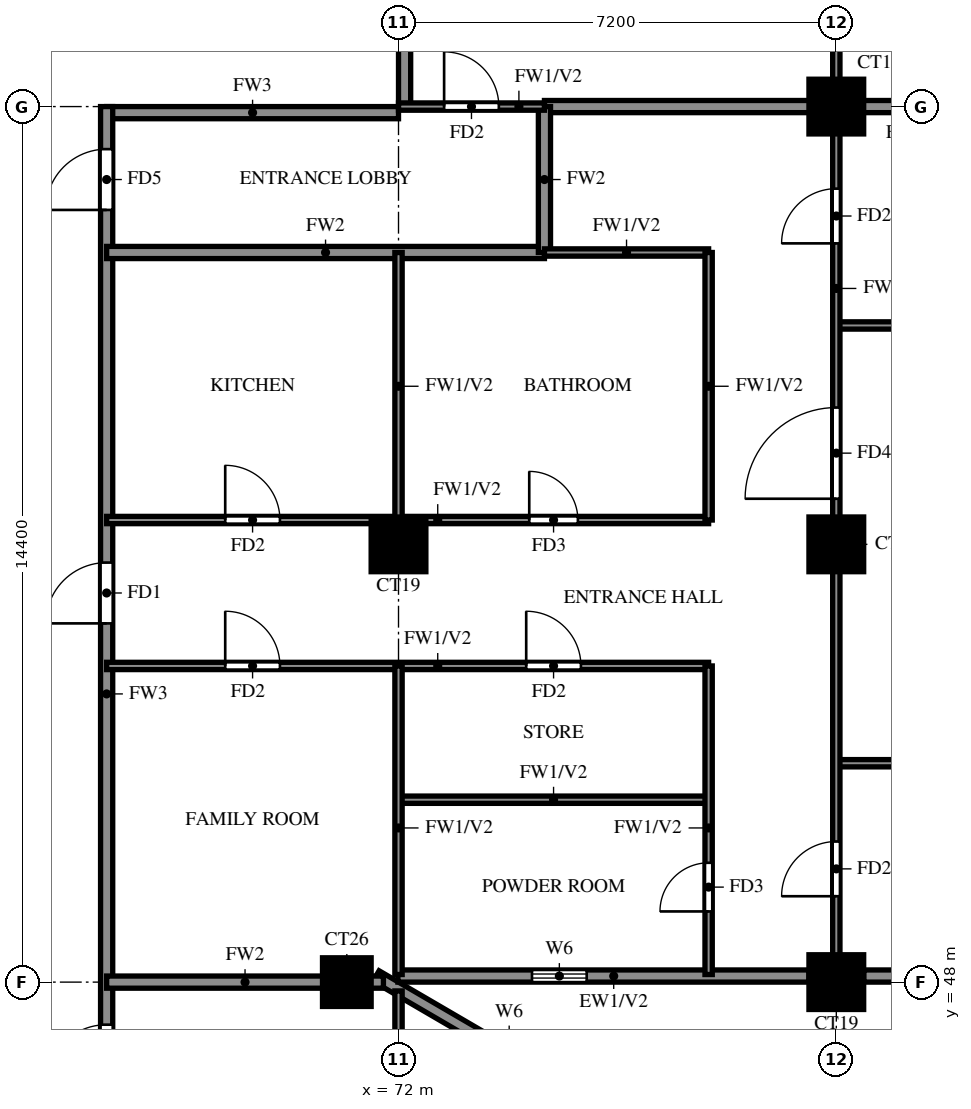
"""IFC4 building model, lengths in metres.
Left out: names, types, materials, properties, quantities, classifications, styles, units other than length and angle.
Written with IfcOpenShell. Run it as: python <this file> out.ifc"""

import sys

from ifc_helpers import new_model, si_unit, direction, frame, frame_2d, origin, origin_2d, place, context, subcontext, project, spatial, rectangle, extrude, source, transform, mapped, element, fill, save


model = new_model("IFC4")
c1 = context("Model", 3, precision=1e-05, world=origin(), true_north=direction((0.0, 1.0)))
c2 = subcontext(c1, "Body", "Model", "MODEL_VIEW")
j1 = project(units=[si_unit("LENGTHUNIT", "METRE"), si_unit("PLANEANGLEUNIT", "RADIAN")], contexts=[c1])
p1 = place(None, origin())
s1 = spatial("IfcSite", under=j1, at=p1, CompositionType="ELEMENT")
p2 = place(p1, origin())
s2 = spatial("IfcBuilding", under=s1, at=p2, CompositionType="ELEMENT")
p3 = place(p2, frame((0.0, 0.0, 188.5)))
s3 = spatial("IfcBuildingStorey", under=s2, at=p3, CompositionType="ELEMENT", Elevation=188.5)
m1 = source(origin(), c2, "Body", "SweptSolid", [
    extrude(rectangle(XDim=0.8, YDim=0.8, at=origin_2d()), origin(), (0.0, 0.0, 1.0), 3.2),
])
p4 = place(p3, frame((71.15, 48.0, 0.0), z_axis=(0.0, 0.0, 1.0), x_axis=(1.0, 0.0, 0.0)))
e1 = element("IfcColumn", 1, at=p4, inside=s3, PredefinedType="COLUMN", context=c2, shape_type="MappedRepresentation", body=[
    mapped(m1, transform((0.0, 0.0, 0.0))),
])
m2 = source(origin(), c2, "Body", "SweptSolid", [
    extrude(rectangle(XDim=0.9, YDim=0.9, at=origin_2d()), origin(), (0.0, 0.0, 1.0), 3.2),
])
for number, where, z_axis, x_axis in (
    (2, (79.2, 48.0, 0.0), (0.0, 0.0, 1.0), (1.0, 0.0, 0.0)),
    (3, (72.0, 55.2, 0.0), (0.0, 0.0, 1.0), (1.0, 0.0, 0.0)),
    (4, (79.2, 55.2, 0.0), (0.0, 0.0, 1.0), (1.0, 0.0, 0.0)),
    (5, (79.2, 62.4, 0.0), (0.0, 0.0, 1.0), (1.0, 0.0, 0.0)),
):
    element("IfcColumn", number, at=place(p3, frame(where, z_axis=z_axis, x_axis=x_axis)), inside=s3, PredefinedType="COLUMN", context=c2, shape_type="MappedRepresentation", body=[
        mapped(m2, transform((0.0, 0.0, 0.0))),
    ])
p5 = place(p3, frame((85.719, 39.881, 0.0), z_axis=(0.0, 0.0, 1.0), x_axis=(-0.86377618652, 0.503875678716, 0.0)))
e6 = element("IfcWall", 6, at=p5, inside=s3, PredefinedType="SOLIDWALL", context=c2, shape_type="SweptSolid", body=[
    extrude(rectangle(XDim=16.311, YDim=0.2, at=frame_2d((8.156, 0.0))), origin(), (0.0, 0.0, 1.0), 3.2),
])
p6 = place(p5, frame((13.326, 0.0, 1.5)))
e7 = element("IfcOpeningElement", 7, at=p6, cuts=e6, PredefinedType="OPENING", context=c2, shape_type="SweptSolid", body=[
    extrude(rectangle(XDim=0.9, YDim=0.9, at=frame_2d((0.45, 0.45))), frame((0.0, 0.11, 0.0), z_axis=(0.0, -1.0, 0.0), x_axis=(1.0, 0.0, 0.0)), (0.0, 0.0, 1.0), 0.22),
])
p7 = place(p3, frame((71.99, 48.1, 0.0), z_axis=(0.0, 0.0, 1.0), x_axis=(1.0, 0.0, 0.0)))
e8 = element("IfcWall", 8, at=p7, inside=s3, PredefinedType="SOLIDWALL", context=c2, shape_type="SweptSolid", body=[
    extrude(rectangle(XDim=6.76, YDim=0.2, at=frame_2d((3.38, 0.0))), origin(), (0.0, 0.0, 1.0), 3.2),
])
p8 = place(p7, frame((2.205, 0.0, 1.5)))
e9 = element("IfcOpeningElement", 9, at=p8, cuts=e8, PredefinedType="OPENING", context=c2, shape_type="SweptSolid", body=[
    extrude(rectangle(XDim=0.9, YDim=0.9, at=frame_2d((0.45, 0.45))), frame((0.0, 0.11, 0.0), z_axis=(0.0, -1.0, 0.0), x_axis=(1.0, 0.0, 0.0)), (0.0, 0.0, 1.0), 0.22),
])
p9 = place(p3, frame((79.65, 48.1, 0.0), z_axis=(0.0, 0.0, 1.0), x_axis=(1.0, 0.0, 0.0)))
e10 = element("IfcWall", 10, at=p9, inside=s3, PredefinedType="SOLIDWALL", context=c2, shape_type="SweptSolid", body=[
    extrude(rectangle(XDim=5.75, YDim=0.2, at=frame_2d((2.875, 0.0))), origin(), (0.0, 0.0, 1.0), 3.2),
])
p10 = place(p9, frame((1.675, 0.0, 0.6)))
e11 = element("IfcOpeningElement", 11, at=p10, cuts=e10, PredefinedType="OPENING", context=c2, shape_type="SweptSolid", body=[
    extrude(rectangle(XDim=2.4, YDim=2.4, at=frame_2d((1.2, 1.2))), frame((0.0, 0.11, 0.0), z_axis=(0.0, -1.0, 0.0), x_axis=(1.0, 0.0, 0.0)), (0.0, 0.0, 1.0), 0.22),
])
p11 = place(p3, frame((67.2, 62.3, 0.0), z_axis=(0.0, 0.0, 1.0), x_axis=(1.0, 0.0, 0.0)))
e12 = element("IfcWall", 12, at=p11, inside=s3, PredefinedType="SOLIDWALL", context=c2, shape_type="SweptSolid", body=[
    extrude(rectangle(XDim=4.8, YDim=0.2, at=frame_2d((2.4, 0.0))), origin(), (0.0, 0.0, 1.0), 3.2),
])
p12 = place(p3, frame((67.2, 45.6, 0.0), z_axis=(0.0, 0.0, 1.0), x_axis=(0.0, 1.0, 0.0)))
e13 = element("IfcWall", 13, at=p12, inside=s3, PredefinedType="SOLIDWALL", context=c2, shape_type="SweptSolid", body=[
    extrude(rectangle(XDim=16.8, YDim=0.2, at=frame_2d((8.4, 0.0))), origin(), (0.0, 0.0, 1.0), 3.2),
])
p13 = place(p12, frame((8.3, 0.0, 0.0)))
e14 = element("IfcOpeningElement", 14, at=p13, cuts=e13, PredefinedType="OPENING", context=c2, shape_type="SweptSolid", body=[
    extrude(rectangle(XDim=1.0, YDim=2.1, at=frame_2d((0.5, 1.05))), frame((0.0, 0.11, 0.0), z_axis=(0.0, -1.0, 0.0), x_axis=(1.0, 0.0, 0.0)), (0.0, 0.0, 1.0), 0.22),
])
p14 = place(p12, frame((15.1, 0.0, 0.0)))
e15 = element("IfcOpeningElement", 15, at=p14, cuts=e13, PredefinedType="OPENING", context=c2, shape_type="SweptSolid", body=[
    extrude(rectangle(XDim=1.0, YDim=2.1, at=frame_2d((0.5, 1.05))), frame((0.0, 0.11, 0.0), z_axis=(0.0, -1.0, 0.0), x_axis=(1.0, 0.0, 0.0)), (0.0, 0.0, 1.0), 0.22),
])
p15 = place(p12, frame((0.7, 0.0, 0.0)))
e16 = element("IfcOpeningElement", 16, at=p15, cuts=e13, PredefinedType="OPENING", context=c2, shape_type="SweptSolid", body=[
    extrude(rectangle(XDim=1.0, YDim=2.1, at=frame_2d((0.5, 1.05))), frame((0.0, 0.11, 0.0), z_axis=(0.0, -1.0, 0.0), x_axis=(1.0, 0.0, 0.0)), (0.0, 0.0, 1.0), 0.22),
])
p16 = place(p3, frame((72.1, 62.4, 0.0), z_axis=(0.0, 0.0, 1.0), x_axis=(0.0, 1.0, 0.0)))
e17 = element("IfcWall", 17, at=p16, inside=s3, PredefinedType="SOLIDWALL", context=c2, shape_type="SweptSolid", body=[
    extrude(rectangle(XDim=15.6, YDim=0.2, at=frame_2d((7.8, 0.0))), origin(), (0.0, 0.0, 1.0), 3.2),
])
p17 = place(p3, frame((67.2, 48.0, 0.0), z_axis=(0.0, 0.0, 1.0), x_axis=(1.0, 0.0, 0.0)))
e18 = element("IfcWall", 18, at=p17, inside=s3, PredefinedType="SOLIDWALL", context=c2, shape_type="SweptSolid", body=[
    extrude(rectangle(XDim=4.552, YDim=0.2, at=frame_2d((2.276, 0.0))), origin(), (0.0, 0.0, 1.0), 3.2),
])
p18 = place(p3, frame((67.2, 60.0, 0.0), z_axis=(0.0, 0.0, 1.0), x_axis=(1.0, 0.0, 0.0)))
e19 = element("IfcWall", 19, at=p18, inside=s3, PredefinedType="SOLIDWALL", context=c2, shape_type="SweptSolid", body=[
    extrude(rectangle(XDim=7.2, YDim=0.2, at=frame_2d((3.6, 0.0))), origin(), (0.0, 0.0, 1.0), 3.2),
])
p19 = place(p3, frame((74.4, 62.4, 0.0), z_axis=(0.0, 0.0, 1.0), x_axis=(1.0, 0.0, 0.0)))
e20 = element("IfcWall", 20, at=p19, inside=s3, PredefinedType="SOLIDWALL", context=c2, shape_type="SweptSolid", body=[
    extrude(rectangle(XDim=11.875, YDim=0.2, at=frame_2d((5.938, 0.0))), origin(), (0.0, 0.0, 1.0), 3.2),
])
p20 = place(p3, frame((74.4, 60.0, 0.0), z_axis=(0.0, 0.0, 1.0), x_axis=(0.0, 1.0, 0.0)))
e21 = element("IfcWall", 21, at=p20, inside=s3, PredefinedType="SOLIDWALL", context=c2, shape_type="SweptSolid", body=[
    extrude(rectangle(XDim=2.4, YDim=0.2, at=frame_2d((1.2, 0.0))), origin(), (0.0, 0.0, 1.0), 3.2),
])
p21 = place(p3, frame((72.0, 51.0, 0.0), z_axis=(0.0, 0.0, 1.0), x_axis=(1.0, 0.0, 0.0)))
e22 = element("IfcWall", 22, at=p21, inside=s3, PredefinedType="PARTITIONING", context=c2, shape_type="SweptSolid", body=[
    extrude(rectangle(XDim=5.1, YDim=0.12, at=frame_2d((2.55, 0.0))), origin(), (0.0, 0.0, 1.0), 3.2),
])
p22 = place(p3, frame((79.2, 51.6, 0.0), z_axis=(0.0, 0.0, 1.0), x_axis=(1.0, 0.0, 0.0)))
e23 = element("IfcWall", 23, at=p22, inside=s3, PredefinedType="PARTITIONING", context=c2, shape_type="SweptSolid", body=[
    extrude(rectangle(XDim=7.075, YDim=0.12, at=frame_2d((3.538, 0.0))), origin(), (0.0, 0.0, 1.0), 2.3),
])
p23 = place(p3, frame((67.2, 53.2, 0.0), z_axis=(0.0, 0.0, 1.0), x_axis=(1.0, 0.0, 0.0)))
e24 = element("IfcWall", 24, at=p23, inside=s3, PredefinedType="PARTITIONING", context=c2, shape_type="SweptSolid", body=[
    extrude(rectangle(XDim=9.9, YDim=0.12, at=frame_2d((4.95, 0.0))), origin(), (0.0, 0.0, 1.0), 3.2),
])
p24 = place(p23, frame((6.9, 0.0, 0.0)))
e25 = element("IfcOpeningElement", 25, at=p24, cuts=e24, PredefinedType="OPENING", context=c2, shape_type="SweptSolid", body=[
    extrude(rectangle(XDim=0.9, YDim=2.1, at=frame_2d((0.45, 1.05))), frame((0.0, 0.07, 0.0), z_axis=(0.0, -1.0, 0.0), x_axis=(1.0, 0.0, 0.0)), (0.0, 0.0, 1.0), 0.14),
])
p25 = place(p23, frame((1.95, 0.0, 0.0)))
e26 = element("IfcOpeningElement", 26, at=p25, cuts=e24, PredefinedType="OPENING", context=c2, shape_type="SweptSolid", body=[
    extrude(rectangle(XDim=0.9, YDim=2.1, at=frame_2d((0.45, 1.05))), frame((0.0, 0.07, 0.0), z_axis=(0.0, -1.0, 0.0), x_axis=(1.0, 0.0, 0.0)), (0.0, 0.0, 1.0), 0.14),
])
p26 = place(p3, frame((67.2, 55.6, 0.0), z_axis=(0.0, 0.0, 1.0), x_axis=(1.0, 0.0, 0.0)))
e27 = element("IfcWall", 27, at=p26, inside=s3, PredefinedType="PARTITIONING", context=c2, shape_type="SweptSolid", body=[
    extrude(rectangle(XDim=9.9, YDim=0.12, at=frame_2d((4.95, 0.0))), origin(), (0.0, 0.0, 1.0), 3.2),
])
p27 = place(p26, frame((6.95, 0.0, 0.0)))
e28 = element("IfcOpeningElement", 28, at=p27, cuts=e27, PredefinedType="OPENING", context=c2, shape_type="SweptSolid", body=[
    extrude(rectangle(XDim=0.8, YDim=2.1, at=frame_2d((0.4, 1.05))), frame((0.0, 0.07, 0.0), z_axis=(0.0, -1.0, 0.0), x_axis=(1.0, 0.0, 0.0)), (0.0, 0.0, 1.0), 0.14),
])
p28 = place(p26, frame((1.95, 0.0, 0.0)))
e29 = element("IfcOpeningElement", 29, at=p28, cuts=e27, PredefinedType="OPENING", context=c2, shape_type="SweptSolid", body=[
    extrude(rectangle(XDim=0.9, YDim=2.1, at=frame_2d((0.45, 1.05))), frame((0.0, 0.07, 0.0), z_axis=(0.0, -1.0, 0.0), x_axis=(1.0, 0.0, 0.0)), (0.0, 0.0, 1.0), 0.14),
])
p29 = place(p3, frame((79.2, 58.8, 0.0), z_axis=(0.0, 0.0, 1.0), x_axis=(1.0, 0.0, 0.0)))
e30 = element("IfcWall", 30, at=p29, inside=s3, PredefinedType="PARTITIONING", context=c2, shape_type="SweptSolid", body=[
    extrude(rectangle(XDim=7.075, YDim=0.12, at=frame_2d((3.538, 0.0))), origin(), (0.0, 0.0, 1.0), 2.3),
])
p30 = place(p3, frame((74.4, 60.0, 0.0), z_axis=(0.0, 0.0, 1.0), x_axis=(1.0, 0.0, 0.0)))
e31 = element("IfcWall", 31, at=p30, inside=s3, PredefinedType="PARTITIONING", context=c2, shape_type="SweptSolid", body=[
    extrude(rectangle(XDim=2.7, YDim=0.12, at=frame_2d((1.35, 0.0))), origin(), (0.0, 0.0, 1.0), 3.2),
])
p31 = place(p3, frame((72.0, 62.4, 0.0), z_axis=(0.0, 0.0, 1.0), x_axis=(1.0, 0.0, 0.0)))
e32 = element("IfcWall", 32, at=p31, inside=s3, PredefinedType="PARTITIONING", context=c2, shape_type="SweptSolid", body=[
    extrude(rectangle(XDim=2.4, YDim=0.12, at=frame_2d((1.2, 0.0))), origin(), (0.0, 0.0, 1.0), 3.2),
])
p32 = place(p31, frame((0.75, 0.0, 0.0)))
e33 = element("IfcOpeningElement", 33, at=p32, cuts=e32, PredefinedType="OPENING", context=c2, shape_type="SweptSolid", body=[
    extrude(rectangle(XDim=0.9, YDim=2.1, at=frame_2d((0.45, 1.05))), frame((0.0, 0.07, 0.0), z_axis=(0.0, -1.0, 0.0), x_axis=(1.0, 0.0, 0.0)), (0.0, 0.0, 1.0), 0.14),
])
p33 = place(p3, frame((72.0, 39.725, 0.0), z_axis=(0.0, 0.0, 1.0), x_axis=(0.0, 1.0, 0.0)))
e34 = element("IfcWall", 34, at=p33, inside=s3, PredefinedType="PARTITIONING", context=c2, shape_type="SweptSolid", body=[
    extrude(rectangle(XDim=8.13, YDim=0.12, at=frame_2d((4.065, 0.0))), origin(), (0.0, 0.0, 1.0), 2.3),
])
p34 = place(p33, frame((1.788, 0.0, 0.0)))
e35 = element("IfcOpeningElement", 35, at=p34, cuts=e34, PredefinedType="OPENING", context=c2, shape_type="SweptSolid", body=[
    extrude(rectangle(XDim=1.5, YDim=2.1, at=frame_2d((0.75, 1.05))), frame((0.0, 0.07, 0.0), z_axis=(0.0, -1.0, 0.0), x_axis=(1.0, 0.0, 0.0)), (0.0, 0.0, 1.0), 0.14),
])
p35 = place(p33, frame((4.575, 0.0, 0.0)))
e36 = element("IfcOpeningElement", 36, at=p35, cuts=e34, PredefinedType="OPENING", context=c2, shape_type="SweptSolid", body=[
    extrude(rectangle(XDim=0.8, YDim=2.1, at=frame_2d((0.4, 1.05))), frame((0.0, 0.07, 0.0), z_axis=(0.0, -1.0, 0.0), x_axis=(1.0, 0.0, 0.0)), (0.0, 0.0, 1.0), 0.14),
])
p36 = place(p3, frame((72.0, 48.125, 0.0), z_axis=(0.0, 0.0, 1.0), x_axis=(0.0, 1.0, 0.0)))
e37 = element("IfcWall", 37, at=p36, inside=s3, PredefinedType="PARTITIONING", context=c2, shape_type="SweptSolid", body=[
    extrude(rectangle(XDim=5.075, YDim=0.12, at=frame_2d((2.538, 0.0))), origin(), (0.0, 0.0, 1.0), 3.2),
])
p37 = place(p3, frame((72.0, 55.6, 0.0), z_axis=(0.0, 0.0, 1.0), x_axis=(0.0, 1.0, 0.0)))
e38 = element("IfcWall", 38, at=p37, inside=s3, PredefinedType="PARTITIONING", context=c2, shape_type="SweptSolid", body=[
    extrude(rectangle(XDim=4.4, YDim=0.12, at=frame_2d((2.2, 0.0))), origin(), (0.0, 0.0, 1.0), 3.2),
])
p38 = place(p3, frame((77.1, 48.125, 0.0), z_axis=(0.0, 0.0, 1.0), x_axis=(0.0, 1.0, 0.0)))
e39 = element("IfcWall", 39, at=p38, inside=s3, PredefinedType="PARTITIONING", context=c2, shape_type="SweptSolid", body=[
    extrude(rectangle(XDim=5.075, YDim=0.12, at=frame_2d((2.538, 0.0))), origin(), (0.0, 0.0, 1.0), 3.2),
])
p39 = place(p38, frame((1.038, 0.0, 0.0)))
e40 = element("IfcOpeningElement", 40, at=p39, cuts=e39, PredefinedType="OPENING", context=c2, shape_type="SweptSolid", body=[
    extrude(rectangle(XDim=0.8, YDim=2.1, at=frame_2d((0.4, 1.05))), frame((0.0, 0.07, 0.0), z_axis=(0.0, -1.0, 0.0), x_axis=(1.0, 0.0, 0.0)), (0.0, 0.0, 1.0), 0.14),
])
p40 = place(p3, frame((77.1, 55.6, 0.0), z_axis=(0.0, 0.0, 1.0), x_axis=(0.0, 1.0, 0.0)))
e41 = element("IfcWall", 41, at=p40, inside=s3, PredefinedType="PARTITIONING", context=c2, shape_type="SweptSolid", body=[
    extrude(rectangle(XDim=4.4, YDim=0.12, at=frame_2d((2.2, 0.0))), origin(), (0.0, 0.0, 1.0), 3.2),
])
p41 = place(p3, frame((79.2, 48.125, 0.0), z_axis=(0.0, 0.0, 1.0), x_axis=(0.0, 1.0, 0.0)))
e42 = element("IfcWall", 42, at=p41, inside=s3, PredefinedType="PARTITIONING", context=c2, shape_type="SweptSolid", body=[
    extrude(rectangle(XDim=25.075, YDim=0.12, at=frame_2d((12.538, 0.0))), origin(), (0.0, 0.0, 1.0), 3.2),
])
p42 = place(p41, frame((1.288, 0.0, 0.0)))
e43 = element("IfcOpeningElement", 43, at=p42, cuts=e42, PredefinedType="OPENING", context=c2, shape_type="SweptSolid", body=[
    extrude(rectangle(XDim=0.9, YDim=2.1, at=frame_2d((0.45, 1.05))), frame((0.0, 0.07, 0.0), z_axis=(0.0, -1.0, 0.0), x_axis=(1.0, 0.0, 0.0)), (0.0, 0.0, 1.0), 0.14),
])
p43 = place(p41, frame((7.825, 0.0, 0.0)))
e44 = element("IfcOpeningElement", 44, at=p43, cuts=e42, PredefinedType="OPENING", context=c2, shape_type="SweptSolid", body=[
    extrude(rectangle(XDim=1.5, YDim=2.1, at=frame_2d((0.75, 1.05))), frame((0.0, 0.07, 0.0), z_axis=(0.0, -1.0, 0.0), x_axis=(1.0, 0.0, 0.0)), (0.0, 0.0, 1.0), 0.14),
])
p44 = place(p41, frame((12.025, 0.0, 0.0)))
e45 = element("IfcOpeningElement", 45, at=p44, cuts=e42, PredefinedType="OPENING", context=c2, shape_type="SweptSolid", body=[
    extrude(rectangle(XDim=0.9, YDim=2.1, at=frame_2d((0.45, 1.05))), frame((0.0, 0.07, 0.0), z_axis=(0.0, -1.0, 0.0), x_axis=(1.0, 0.0, 0.0)), (0.0, 0.0, 1.0), 0.14),
])
p45 = place(p41, frame((15.625, 0.0, 0.0)))
e46 = element("IfcOpeningElement", 46, at=p45, cuts=e42, PredefinedType="OPENING", context=c2, shape_type="SweptSolid", body=[
    extrude(rectangle(XDim=0.9, YDim=2.1, at=frame_2d((0.45, 1.05))), frame((0.0, 0.07, 0.0), z_axis=(0.0, -1.0, 0.0), x_axis=(1.0, 0.0, 0.0)), (0.0, 0.0, 1.0), 0.14),
])
p46 = place(p41, frame((19.225, 0.0, 0.0)))
e47 = element("IfcOpeningElement", 47, at=p46, cuts=e42, PredefinedType="OPENING", context=c2, shape_type="SweptSolid", body=[
    extrude(rectangle(XDim=0.9, YDim=2.1, at=frame_2d((0.45, 1.05))), frame((0.0, 0.07, 0.0), z_axis=(0.0, -1.0, 0.0), x_axis=(1.0, 0.0, 0.0)), (0.0, 0.0, 1.0), 0.14),
])
p47 = place(p41, frame((22.825, 0.0, 0.0)))
e48 = element("IfcOpeningElement", 48, at=p47, cuts=e42, PredefinedType="OPENING", context=c2, shape_type="SweptSolid", body=[
    extrude(rectangle(XDim=0.9, YDim=2.1, at=frame_2d((0.45, 1.05))), frame((0.0, 0.07, 0.0), z_axis=(0.0, -1.0, 0.0), x_axis=(1.0, 0.0, 0.0)), (0.0, 0.0, 1.0), 0.14),
])
p48 = place(p8, origin())
e49 = element("IfcWindow", 49, at=p48, inside=s3, PartitioningType="SINGLE_PANEL", PredefinedType="WINDOW", context=c2, shape_type="SweptSolid", body=[
    extrude(rectangle(XDim=0.9, YDim=0.9, at=frame_2d((0.45, 0.45))), frame((0.0, 0.03, 0.0), z_axis=(0.0, -1.0, 0.0), x_axis=(1.0, 0.0, 0.0)), (0.0, 0.0, 1.0), 0.06),
])
fill(e9, e49)
p49 = place(p13, origin())
e50 = element("IfcDoor", 50, at=p49, inside=s3, OperationType="SINGLE_SWING_LEFT", PredefinedType="DOOR", context=c2, shape_type="SweptSolid", body=[
    extrude(rectangle(XDim=1.0, YDim=2.1, at=frame_2d((0.5, 1.05))), frame((0.0, 0.025, 0.0), z_axis=(0.0, -1.0, 0.0), x_axis=(1.0, 0.0, 0.0)), (0.0, 0.0, 1.0), 0.05),
])
fill(e14, e50)
p50 = place(p42, origin())
e51 = element("IfcDoor", 51, at=p50, inside=s3, OperationType="SINGLE_SWING_LEFT", PredefinedType="DOOR", context=c2, shape_type="SweptSolid", body=[
    extrude(rectangle(XDim=0.9, YDim=2.1, at=frame_2d((0.45, 1.05))), frame((0.0, 0.025, 0.0), z_axis=(0.0, -1.0, 0.0), x_axis=(1.0, 0.0, 0.0)), (0.0, 0.0, 1.0), 0.05),
])
fill(e43, e51)
p51 = place(p43, origin())
e52 = element("IfcDoor", 52, at=p51, inside=s3, OperationType="SINGLE_SWING_LEFT", PredefinedType="DOOR", context=c2, shape_type="SweptSolid", body=[
    extrude(rectangle(XDim=1.5, YDim=2.1, at=frame_2d((0.75, 1.05))), frame((0.0, 0.025, 0.0), z_axis=(0.0, -1.0, 0.0), x_axis=(1.0, 0.0, 0.0)), (0.0, 0.0, 1.0), 0.05),
])
fill(e44, e52)
p52 = place(p44, origin())
e53 = element("IfcDoor", 53, at=p52, inside=s3, OperationType="SINGLE_SWING_LEFT", PredefinedType="DOOR", context=c2, shape_type="SweptSolid", body=[
    extrude(rectangle(XDim=0.9, YDim=2.1, at=frame_2d((0.45, 1.05))), frame((0.0, 0.025, 0.0), z_axis=(0.0, -1.0, 0.0), x_axis=(1.0, 0.0, 0.0)), (0.0, 0.0, 1.0), 0.05),
])
fill(e45, e53)
p53 = place(p39, origin())
e54 = element("IfcDoor", 54, at=p53, inside=s3, OperationType="SINGLE_SWING_LEFT", PredefinedType="DOOR", context=c2, shape_type="SweptSolid", body=[
    extrude(rectangle(XDim=0.8, YDim=2.1, at=frame_2d((0.4, 1.05))), frame((0.0, 0.025, 0.0), z_axis=(0.0, -1.0, 0.0), x_axis=(1.0, 0.0, 0.0)), (0.0, 0.0, 1.0), 0.05),
])
fill(e40, e54)
p54 = place(p24, origin())
e55 = element("IfcDoor", 55, at=p54, inside=s3, OperationType="SINGLE_SWING_RIGHT", PredefinedType="DOOR", context=c2, shape_type="SweptSolid", body=[
    extrude(rectangle(XDim=0.9, YDim=2.1, at=frame_2d((0.45, 1.05))), frame((0.0, 0.025, 0.0), z_axis=(0.0, -1.0, 0.0), x_axis=(1.0, 0.0, 0.0)), (0.0, 0.0, 1.0), 0.05),
])
fill(e25, e55)
p55 = place(p27, origin())
e56 = element("IfcDoor", 56, at=p55, inside=s3, OperationType="SINGLE_SWING_LEFT", PredefinedType="DOOR", context=c2, shape_type="SweptSolid", body=[
    extrude(rectangle(XDim=0.8, YDim=2.1, at=frame_2d((0.4, 1.05))), frame((0.0, 0.025, 0.0), z_axis=(0.0, -1.0, 0.0), x_axis=(1.0, 0.0, 0.0)), (0.0, 0.0, 1.0), 0.05),
])
fill(e28, e56)
p56 = place(p25, origin())
e57 = element("IfcDoor", 57, at=p56, inside=s3, OperationType="SINGLE_SWING_LEFT", PredefinedType="DOOR", context=c2, shape_type="SweptSolid", body=[
    extrude(rectangle(XDim=0.9, YDim=2.1, at=frame_2d((0.45, 1.05))), frame((0.0, 0.025, 0.0), z_axis=(0.0, -1.0, 0.0), x_axis=(1.0, 0.0, 0.0)), (0.0, 0.0, 1.0), 0.05),
])
fill(e26, e57)
p57 = place(p28, origin())
e58 = element("IfcDoor", 58, at=p57, inside=s3, OperationType="SINGLE_SWING_RIGHT", PredefinedType="DOOR", context=c2, shape_type="SweptSolid", body=[
    extrude(rectangle(XDim=0.9, YDim=2.1, at=frame_2d((0.45, 1.05))), frame((0.0, 0.025, 0.0), z_axis=(0.0, -1.0, 0.0), x_axis=(1.0, 0.0, 0.0)), (0.0, 0.0, 1.0), 0.05),
])
fill(e29, e58)
p58 = place(p32, origin())
e59 = element("IfcDoor", 59, at=p58, inside=s3, OperationType="SINGLE_SWING_LEFT", PredefinedType="DOOR", context=c2, shape_type="SweptSolid", body=[
    extrude(rectangle(XDim=0.9, YDim=2.1, at=frame_2d((0.45, 1.05))), frame((0.0, 0.025, 0.0), z_axis=(0.0, -1.0, 0.0), x_axis=(1.0, 0.0, 0.0)), (0.0, 0.0, 1.0), 0.05),
])
fill(e33, e59)
p59 = place(p14, origin())
e60 = element("IfcDoor", 60, at=p59, inside=s3, OperationType="SINGLE_SWING_RIGHT", PredefinedType="DOOR", context=c2, shape_type="SweptSolid", body=[
    extrude(rectangle(XDim=1.0, YDim=2.1, at=frame_2d((0.5, 1.05))), frame((0.0, 0.025, 0.0), z_axis=(0.0, -1.0, 0.0), x_axis=(1.0, 0.0, 0.0)), (0.0, 0.0, 1.0), 0.05),
])
fill(e15, e60)
p60 = place(p15, origin())
e61 = element("IfcDoor", 61, at=p60, inside=s3, OperationType="SINGLE_SWING_RIGHT", PredefinedType="DOOR", context=c2, shape_type="SweptSolid", body=[
    extrude(rectangle(XDim=1.0, YDim=2.1, at=frame_2d((0.5, 1.05))), frame((0.0, 0.025, 0.0), z_axis=(0.0, -1.0, 0.0), x_axis=(1.0, 0.0, 0.0)), (0.0, 0.0, 1.0), 0.05),
])
fill(e16, e61)
save(model, sys.argv[1])
